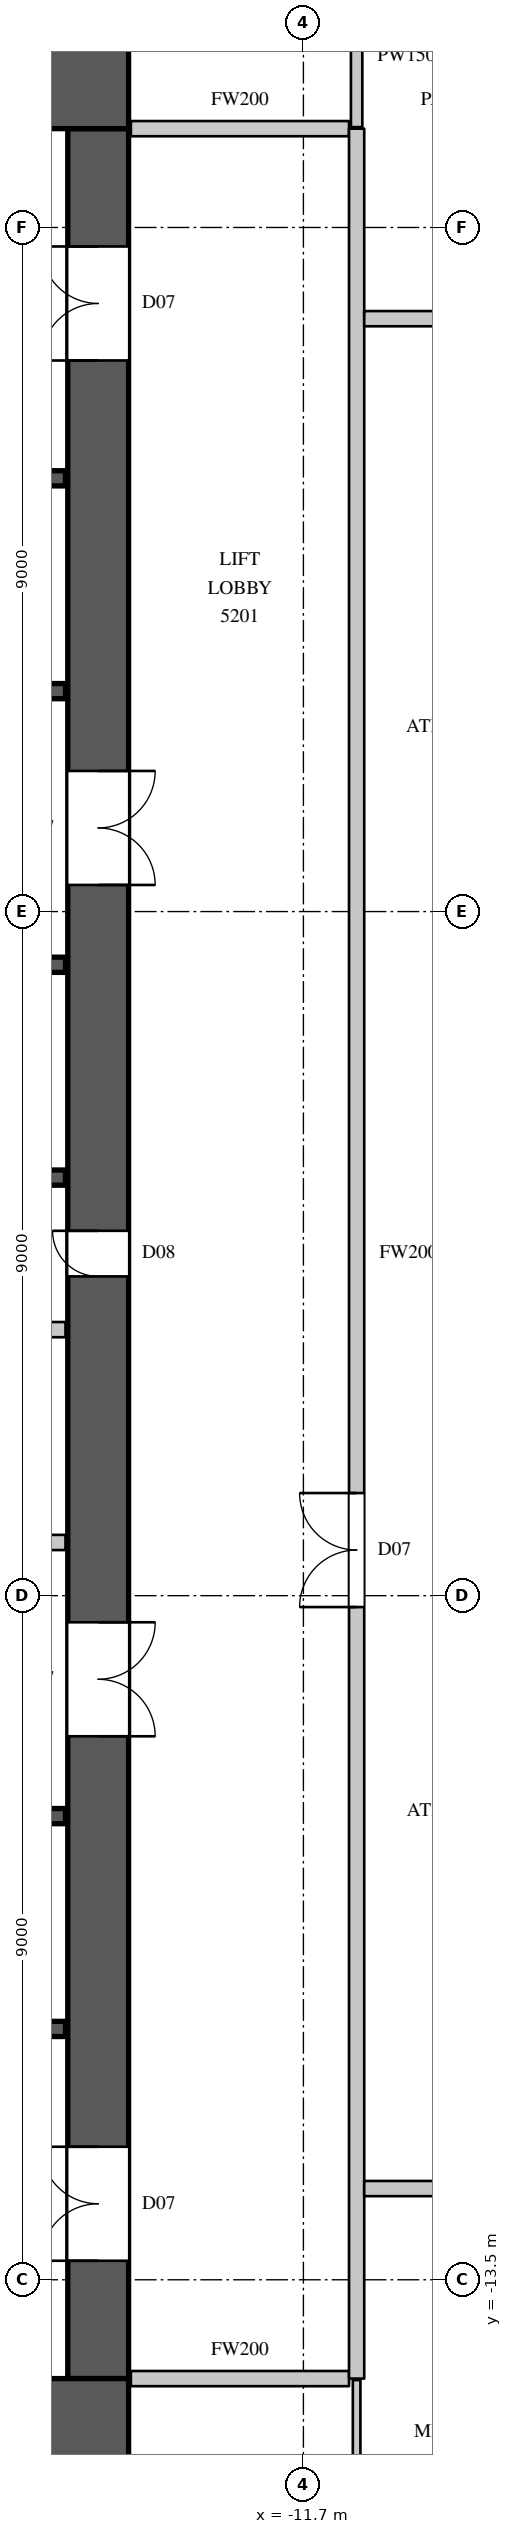
"""IFC4 building model, lengths in metres.
Left out: names, types, materials, properties, quantities, classifications, styles, units other than length and angle.
Written with IfcOpenShell. Run it as: python <this file> out.ifc"""

import sys

from ifc_helpers import new_model, si_unit, direction, frame, frame_2d, origin, place, context, subcontext, project, spatial, rectangle, extrude, element, fill, save


model = new_model("IFC4")
c1 = context("Model", 3, precision=1e-05, world=origin(), true_north=direction((0.0, 1.0)))
c2 = subcontext(c1, "Body", "Model", "MODEL_VIEW")
j1 = project(units=[si_unit("LENGTHUNIT", "METRE"), si_unit("PLANEANGLEUNIT", "RADIAN")], contexts=[c1])
p1 = place(None, origin())
s1 = spatial("IfcSite", under=j1, at=p1, CompositionType="ELEMENT")
p2 = place(p1, origin())
s2 = spatial("IfcBuilding", under=s1, at=p2, CompositionType="ELEMENT")
p3 = place(p2, frame((0.0, 0.0, 234.3)))
s3 = spatial("IfcBuildingStorey", under=s2, at=p3, CompositionType="ELEMENT", Elevation=234.3)
for number, where, z_axis, x_axis in (
    (1, (-30.0, 15.4, 0.0), (0.0, 0.0, 1.0), (1.0, 0.0, 0.0)),
    (2, (-30.0, -15.4, 0.0), (0.0, 0.0, 1.0), (1.0, 0.0, 0.0)),
):
    element("IfcWall", number, at=place(p3, frame(where, z_axis=z_axis, x_axis=x_axis)), inside=s3, PredefinedType="SHEAR", context=c2, shape_type="SweptSolid", body=[
        extrude(rectangle(XDim=16.0, YDim=1.2, at=frame_2d((8.0, 0.0))), origin(), (0.0, 0.0, 1.0), 4.1),
    ])
p4 = place(p3, frame((-14.4, -14.8, 0.0), z_axis=(0.0, 0.0, 1.0), x_axis=(0.0, 1.0, 0.0)))
e3 = element("IfcWall", 3, at=p4, inside=s3, PredefinedType="SHEAR", context=c2, shape_type="SweptSolid", body=[
    extrude(rectangle(XDim=29.6, YDim=0.8, at=frame_2d((14.8, 0.0))), origin(), (0.0, 0.0, 1.0), 4.1),
])
p5 = place(p4, frame((1.55, 0.0, 0.0)))
e4 = element("IfcOpeningElement", 4, at=p5, cuts=e3, PredefinedType="OPENING", context=c2, shape_type="SweptSolid", body=[
    extrude(rectangle(XDim=1.5, YDim=2.4, at=frame_2d((0.75, 1.2))), frame((0.0, 0.41, 0.0), z_axis=(0.0, -1.0, 0.0), x_axis=(1.0, 0.0, 0.0)), (0.0, 0.0, 1.0), 0.82),
])
p6 = place(p4, frame((26.55, 0.0, 0.0)))
e5 = element("IfcOpeningElement", 5, at=p6, cuts=e3, PredefinedType="OPENING", context=c2, shape_type="SweptSolid", body=[
    extrude(rectangle(XDim=1.5, YDim=2.4, at=frame_2d((0.75, 1.2))), frame((0.0, 0.41, 0.0), z_axis=(0.0, -1.0, 0.0), x_axis=(1.0, 0.0, 0.0)), (0.0, 0.0, 1.0), 0.82),
])
p7 = place(p4, frame((8.45, 0.0, 0.0)))
e6 = element("IfcOpeningElement", 6, at=p7, cuts=e3, PredefinedType="OPENING", context=c2, shape_type="SweptSolid", body=[
    extrude(rectangle(XDim=1.5, YDim=2.4, at=frame_2d((0.75, 1.2))), frame((0.0, 0.41, 0.0), z_axis=(0.0, -1.0, 0.0), x_axis=(1.0, 0.0, 0.0)), (0.0, 0.0, 1.0), 0.82),
])
p8 = place(p4, frame((19.65, 0.0, 0.0)))
e7 = element("IfcOpeningElement", 7, at=p8, cuts=e3, PredefinedType="OPENING", context=c2, shape_type="SweptSolid", body=[
    extrude(rectangle(XDim=1.5, YDim=2.4, at=frame_2d((0.75, 1.2))), frame((0.0, 0.41, 0.0), z_axis=(0.0, -1.0, 0.0), x_axis=(1.0, 0.0, 0.0)), (0.0, 0.0, 1.0), 0.82),
])
p9 = place(p4, frame((14.5, 0.0, 0.0)))
e8 = element("IfcOpeningElement", 8, at=p9, cuts=e3, PredefinedType="OPENING", context=c2, shape_type="SweptSolid", body=[
    extrude(rectangle(XDim=0.6, YDim=2.0, at=frame_2d((0.3, 1.0))), frame((0.0, 0.41, 0.0), z_axis=(0.0, -1.0, 0.0), x_axis=(1.0, 0.0, 0.0)), (0.0, 0.0, 1.0), 0.82),
])
p10 = place(p3, frame((-18.18, -3.8, 0.0), z_axis=(0.0, 0.0, 1.0), x_axis=(1.0, 0.0, 0.0)))
e9 = element("IfcWall", 9, at=p10, inside=s3, PredefinedType="PARTITIONING", context=c2, shape_type="SweptSolid", body=[
    extrude(rectangle(XDim=3.35, YDim=0.2, at=frame_2d((1.675, 0.0))), origin(), (0.0, 0.0, 1.0), 3.8),
])
p11 = place(p10, frame((1.2, 0.0, 0.0)))
e10 = element("IfcOpeningElement", 10, at=p11, cuts=e9, PredefinedType="OPENING", context=c2, shape_type="SweptSolid", body=[
    extrude(rectangle(XDim=0.9, YDim=2.2, at=frame_2d((0.45, 1.1))), frame((0.0, 0.11, 0.0), z_axis=(0.0, -1.0, 0.0), x_axis=(1.0, 0.0, 0.0)), (0.0, 0.0, 1.0), 0.22),
])
for number, where, z_axis, x_axis in (
    (11, (-13.97, -14.8, 0.0), (0.0, 0.0, 1.0), (1.0, 0.0, 0.0)),
    (12, (-13.97, 14.8, 0.0), (0.0, 0.0, 1.0), (1.0, 0.0, 0.0)),
):
    element("IfcWall", number, at=place(p3, frame(where, z_axis=z_axis, x_axis=x_axis)), inside=s3, PredefinedType="PARTITIONING", context=c2, shape_type="SweptSolid", body=[
        extrude(rectangle(XDim=2.87, YDim=0.2, at=frame_2d((1.435, 0.0))), origin(), (0.0, 0.0, 1.0), 3.8),
    ])
p12 = place(p3, frame((-11.0, -14.8, 0.0), z_axis=(0.0, 0.0, 1.0), x_axis=(0.0, 1.0, 0.0)))
e13 = element("IfcWall", 13, at=p12, inside=s3, PredefinedType="PARTITIONING", context=c2, shape_type="SweptSolid", body=[
    extrude(rectangle(XDim=29.6, YDim=0.2, at=frame_2d((14.8, 0.0))), origin(), (0.0, 0.0, 1.0), 3.8),
])
p13 = place(p12, frame((10.15, 0.0, 0.0)))
e14 = element("IfcOpeningElement", 14, at=p13, cuts=e13, PredefinedType="OPENING", context=c2, shape_type="SweptSolid", body=[
    extrude(rectangle(XDim=1.5, YDim=2.4, at=frame_2d((0.75, 1.2))), frame((0.0, 0.11, 0.0), z_axis=(0.0, -1.0, 0.0), x_axis=(1.0, 0.0, 0.0)), (0.0, 0.0, 1.0), 0.22),
])
p14 = place(p3, frame((-10.9, -12.3, 0.0), z_axis=(0.0, 0.0, 1.0), x_axis=(1.0, 0.0, 0.0)))
e15 = element("IfcWall", 15, at=p14, inside=s3, PredefinedType="PARTITIONING", context=c2, shape_type="SweptSolid", body=[
    extrude(rectangle(XDim=22.1, YDim=0.2, at=frame_2d((11.05, 0.0))), origin(), (0.0, 0.0, 1.0), 3.8),
])
p15 = place(p14, frame((1.1, 0.0, 0.0)))
e16 = element("IfcOpeningElement", 16, at=p15, cuts=e15, PredefinedType="OPENING", context=c2, shape_type="SweptSolid", body=[
    extrude(rectangle(XDim=0.9, YDim=2.2, at=frame_2d((0.45, 1.1))), frame((0.0, 0.11, 0.0), z_axis=(0.0, -1.0, 0.0), x_axis=(1.0, 0.0, 0.0)), (0.0, 0.0, 1.0), 0.22),
])
p16 = place(p14, frame((4.9, 0.0, 0.0)))
e17 = element("IfcOpeningElement", 17, at=p16, cuts=e15, PredefinedType="OPENING", context=c2, shape_type="SweptSolid", body=[
    extrude(rectangle(XDim=0.9, YDim=2.2, at=frame_2d((0.45, 1.1))), frame((0.0, 0.11, 0.0), z_axis=(0.0, -1.0, 0.0), x_axis=(1.0, 0.0, 0.0)), (0.0, 0.0, 1.0), 0.22),
])
p17 = place(p14, frame((7.55, 0.0, 0.0)))
e18 = element("IfcOpeningElement", 18, at=p17, cuts=e15, PredefinedType="OPENING", context=c2, shape_type="SweptSolid", body=[
    extrude(rectangle(XDim=0.9, YDim=2.2, at=frame_2d((0.45, 1.1))), frame((0.0, 0.11, 0.0), z_axis=(0.0, -1.0, 0.0), x_axis=(1.0, 0.0, 0.0)), (0.0, 0.0, 1.0), 0.22),
])
p18 = place(p14, frame((9.95, 0.0, 0.0)))
e19 = element("IfcOpeningElement", 19, at=p18, cuts=e15, PredefinedType="OPENING", context=c2, shape_type="SweptSolid", body=[
    extrude(rectangle(XDim=1.1, YDim=2.4, at=frame_2d((0.55, 1.2))), frame((0.0, 0.11, 0.0), z_axis=(0.0, -1.0, 0.0), x_axis=(1.0, 0.0, 0.0)), (0.0, 0.0, 1.0), 0.22),
])
p19 = place(p14, frame((14.4, 0.0, 0.0)))
e20 = element("IfcOpeningElement", 20, at=p19, cuts=e15, PredefinedType="OPENING", context=c2, shape_type="SweptSolid", body=[
    extrude(rectangle(XDim=1.1, YDim=2.4, at=frame_2d((0.55, 1.2))), frame((0.0, 0.11, 0.0), z_axis=(0.0, -1.0, 0.0), x_axis=(1.0, 0.0, 0.0)), (0.0, 0.0, 1.0), 0.22),
])
p20 = place(p14, frame((17.95, 0.0, 0.0)))
e21 = element("IfcOpeningElement", 21, at=p20, cuts=e15, PredefinedType="OPENING", context=c2, shape_type="SweptSolid", body=[
    extrude(rectangle(XDim=1.1, YDim=2.4, at=frame_2d((0.55, 1.2))), frame((0.0, 0.11, 0.0), z_axis=(0.0, -1.0, 0.0), x_axis=(1.0, 0.0, 0.0)), (0.0, 0.0, 1.0), 0.22),
])
p21 = place(p3, frame((-10.9, 12.3, 0.0), z_axis=(0.0, 0.0, 1.0), x_axis=(1.0, 0.0, 0.0)))
e22 = element("IfcWall", 22, at=p21, inside=s3, PredefinedType="PARTITIONING", context=c2, shape_type="SweptSolid", body=[
    extrude(rectangle(XDim=3.735, YDim=0.2, at=frame_2d((1.867, 0.0))), origin(), (0.0, 0.0, 1.0), 3.8),
])
p22 = place(p21, frame((1.7, 0.0, 0.0)))
e23 = element("IfcOpeningElement", 23, at=p22, cuts=e22, PredefinedType="OPENING", context=c2, shape_type="SweptSolid", body=[
    extrude(rectangle(XDim=1.1, YDim=2.4, at=frame_2d((0.55, 1.2))), frame((0.0, 0.11, 0.0), z_axis=(0.0, -1.0, 0.0), x_axis=(1.0, 0.0, 0.0)), (0.0, 0.0, 1.0), 0.22),
])
p23 = place(p3, frame((-11.0, 14.82, 0.0), z_axis=(0.0, 0.0, 1.0), x_axis=(0.0, 1.0, 0.0)))
e24 = element("IfcWall", 24, at=p23, inside=s3, PredefinedType="PARTITIONING", context=c2, shape_type="SweptSolid", body=[
    extrude(rectangle(XDim=1.88, YDim=0.15, at=frame_2d((0.94, 0.0))), origin(), (0.0, 0.0, 1.0), 3.8),
])
p24 = place(p3, frame((-29.17, -1.0, 0.0), z_axis=(0.0, 0.0, 1.0), x_axis=(1.0, 0.0, 0.0)))
e25 = element("IfcWall", 25, at=p24, inside=s3, PredefinedType="PARTITIONING", context=c2, shape_type="SweptSolid", body=[
    extrude(rectangle(XDim=14.34, YDim=0.2, at=frame_2d((7.17, 0.0))), origin(), (0.0, 0.0, 1.0), 3.8),
])
p25 = place(p3, frame((-26.08, 1.0, 0.0), z_axis=(0.0, 0.0, 1.0), x_axis=(1.0, 0.0, 0.0)))
e26 = element("IfcWall", 26, at=p25, inside=s3, PredefinedType="SHEAR", context=c2, shape_type="SweptSolid", body=[
    extrude(rectangle(XDim=11.25, YDim=0.2, at=frame_2d((5.625, 0.0))), origin(), (0.0, 0.0, 1.0), 3.8),
])
p26 = place(p3, frame((-26.08, 3.8, 0.0), z_axis=(0.0, 0.0, 1.0), x_axis=(1.0, 0.0, 0.0)))
e27 = element("IfcWall", 27, at=p26, inside=s3, PredefinedType="SHEAR", context=c2, shape_type="SweptSolid", body=[
    extrude(rectangle(XDim=11.25, YDim=0.2, at=frame_2d((5.625, 0.0))), origin(), (0.0, 0.0, 1.0), 3.8),
])
p27 = place(p26, frame((0.8, 0.0, 0.0)))
e28 = element("IfcOpeningElement", 28, at=p27, cuts=e27, PredefinedType="OPENING", context=c2, shape_type="SweptSolid", body=[
    extrude(rectangle(XDim=1.1, YDim=2.2, at=frame_2d((0.55, 1.1))), frame((0.0, 0.11, 0.0), z_axis=(0.0, -1.0, 0.0), x_axis=(1.0, 0.0, 0.0)), (0.0, 0.0, 1.0), 0.22),
])
p28 = place(p26, frame((3.55, 0.0, 0.0)))
e29 = element("IfcOpeningElement", 29, at=p28, cuts=e27, PredefinedType="OPENING", context=c2, shape_type="SweptSolid", body=[
    extrude(rectangle(XDim=1.1, YDim=2.2, at=frame_2d((0.55, 1.1))), frame((0.0, 0.11, 0.0), z_axis=(0.0, -1.0, 0.0), x_axis=(1.0, 0.0, 0.0)), (0.0, 0.0, 1.0), 0.22),
])
p29 = place(p26, frame((6.25, 0.0, 0.0)))
e30 = element("IfcOpeningElement", 30, at=p29, cuts=e27, PredefinedType="OPENING", context=c2, shape_type="SweptSolid", body=[
    extrude(rectangle(XDim=1.1, YDim=2.2, at=frame_2d((0.55, 1.1))), frame((0.0, 0.11, 0.0), z_axis=(0.0, -1.0, 0.0), x_axis=(1.0, 0.0, 0.0)), (0.0, 0.0, 1.0), 0.22),
])
p30 = place(p26, frame((9.15, 0.0, 0.0)))
e31 = element("IfcOpeningElement", 31, at=p30, cuts=e27, PredefinedType="OPENING", context=c2, shape_type="SweptSolid", body=[
    extrude(rectangle(XDim=1.1, YDim=2.2, at=frame_2d((0.55, 1.1))), frame((0.0, 0.11, 0.0), z_axis=(0.0, -1.0, 0.0), x_axis=(1.0, 0.0, 0.0)), (0.0, 0.0, 1.0), 0.22),
])
p31 = place(p3, frame((-17.92, -10.2, 0.0), z_axis=(0.0, 0.0, 1.0), x_axis=(1.0, 0.0, 0.0)))
e32 = element("IfcWall", 32, at=p31, inside=s3, PredefinedType="SHEAR", context=c2, shape_type="SweptSolid", body=[
    extrude(rectangle(XDim=3.09, YDim=0.2, at=frame_2d((1.545, 0.0))), origin(), (0.0, 0.0, 1.0), 3.8),
])
p32 = place(p31, frame((1.0, 0.0, 0.0)))
e33 = element("IfcOpeningElement", 33, at=p32, cuts=e32, PredefinedType="OPENING", context=c2, shape_type="SweptSolid", body=[
    extrude(rectangle(XDim=1.1, YDim=2.2, at=frame_2d((0.55, 1.1))), frame((0.0, 0.11, 0.0), z_axis=(0.0, -1.0, 0.0), x_axis=(1.0, 0.0, 0.0)), (0.0, 0.0, 1.0), 0.22),
])
p33 = place(p3, frame((-17.9, -7.4, 0.0), z_axis=(0.0, 0.0, 1.0), x_axis=(1.0, 0.0, 0.0)))
e34 = element("IfcWall", 34, at=p33, inside=s3, PredefinedType="SHEAR", context=c2, shape_type="SweptSolid", body=[
    extrude(rectangle(XDim=3.07, YDim=0.2, at=frame_2d((1.535, 0.0))), origin(), (0.0, 0.0, 1.0), 3.8),
])
p34 = place(p3, frame((-17.92, 7.4, 0.0), z_axis=(0.0, 0.0, 1.0), x_axis=(1.0, 0.0, 0.0)))
e35 = element("IfcWall", 35, at=p34, inside=s3, PredefinedType="SHEAR", context=c2, shape_type="SweptSolid", body=[
    extrude(rectangle(XDim=3.09, YDim=0.2, at=frame_2d((1.545, 0.0))), origin(), (0.0, 0.0, 1.0), 3.8),
])
p35 = place(p3, frame((-17.92, 10.2, 0.0), z_axis=(0.0, 0.0, 1.0), x_axis=(1.0, 0.0, 0.0)))
e36 = element("IfcWall", 36, at=p35, inside=s3, PredefinedType="SHEAR", context=c2, shape_type="SweptSolid", body=[
    extrude(rectangle(XDim=3.09, YDim=0.2, at=frame_2d((1.545, 0.0))), origin(), (0.0, 0.0, 1.0), 3.8),
])
p36 = place(p35, frame((1.0, 0.0, 0.0)))
e37 = element("IfcOpeningElement", 37, at=p36, cuts=e36, PredefinedType="OPENING", context=c2, shape_type="SweptSolid", body=[
    extrude(rectangle(XDim=1.1, YDim=2.2, at=frame_2d((0.55, 1.1))), frame((0.0, 0.11, 0.0), z_axis=(0.0, -1.0, 0.0), x_axis=(1.0, 0.0, 0.0)), (0.0, 0.0, 1.0), 0.22),
])
p37 = place(p3, frame((-11.0, -16.7, 0.0), z_axis=(0.0, 0.0, 1.0), x_axis=(0.0, 1.0, 0.0)))
e38 = element("IfcWall", 38, at=p37, inside=s3, PredefinedType="PARTITIONING", context=c2, shape_type="SweptSolid", body=[
    extrude(rectangle(XDim=1.88, YDim=0.1, at=frame_2d((0.94, 0.0))), origin(), (0.0, 0.0, 1.0), 3.8),
])
p38 = place(p13, origin())
e39 = element("IfcDoor", 39, at=p38, inside=s3, OperationType="DOUBLE_DOOR_SINGLE_SWING", PredefinedType="DOOR", context=c2, shape_type="SweptSolid", body=[
    extrude(rectangle(XDim=1.5, YDim=2.4, at=frame_2d((0.75, 1.2))), frame((0.0, 0.025, 0.0), z_axis=(0.0, -1.0, 0.0), x_axis=(1.0, 0.0, 0.0)), (0.0, 0.0, 1.0), 0.05),
])
fill(e14, e39)
p39 = place(p5, origin())
e40 = element("IfcDoor", 40, at=p39, inside=s3, OperationType="DOUBLE_DOOR_SINGLE_SWING", PredefinedType="DOOR", context=c2, shape_type="SweptSolid", body=[
    extrude(rectangle(XDim=1.5, YDim=2.4, at=frame_2d((0.75, 1.2))), frame((0.0, 0.395, 0.0), z_axis=(0.0, -1.0, 0.0), x_axis=(1.0, 0.0, 0.0)), (0.0, 0.0, 1.0), 0.05),
])
fill(e4, e40)
p40 = place(p6, origin())
e41 = element("IfcDoor", 41, at=p40, inside=s3, OperationType="DOUBLE_DOOR_SINGLE_SWING", PredefinedType="DOOR", context=c2, shape_type="SweptSolid", body=[
    extrude(rectangle(XDim=1.5, YDim=2.4, at=frame_2d((0.75, 1.2))), frame((0.0, 0.395, 0.0), z_axis=(0.0, -1.0, 0.0), x_axis=(1.0, 0.0, 0.0)), (0.0, 0.0, 1.0), 0.05),
])
fill(e5, e41)
p41 = place(p7, origin())
e42 = element("IfcDoor", 42, at=p41, inside=s3, OperationType="DOUBLE_DOOR_SINGLE_SWING", PredefinedType="DOOR", context=c2, shape_type="SweptSolid", body=[
    extrude(rectangle(XDim=1.5, YDim=2.4, at=frame_2d((0.75, 1.2))), frame((0.0, -0.345, 0.0), z_axis=(0.0, -1.0, 0.0), x_axis=(1.0, 0.0, 0.0)), (0.0, 0.0, 1.0), 0.05),
])
fill(e6, e42)
p42 = place(p8, origin())
e43 = element("IfcDoor", 43, at=p42, inside=s3, OperationType="DOUBLE_DOOR_SINGLE_SWING", PredefinedType="DOOR", context=c2, shape_type="SweptSolid", body=[
    extrude(rectangle(XDim=1.5, YDim=2.4, at=frame_2d((0.75, 1.2))), frame((0.0, -0.345, 0.0), z_axis=(0.0, -1.0, 0.0), x_axis=(1.0, 0.0, 0.0)), (0.0, 0.0, 1.0), 0.05),
])
fill(e7, e43)
p43 = place(p9, origin())
e44 = element("IfcDoor", 44, at=p43, inside=s3, OperationType="SINGLE_SWING_RIGHT", PredefinedType="DOOR", context=c2, shape_type="SweptSolid", body=[
    extrude(rectangle(XDim=0.6, YDim=2.0, at=frame_2d((0.3, 1.0))), frame((0.0, 0.395, 0.0), z_axis=(0.0, -1.0, 0.0), x_axis=(1.0, 0.0, 0.0)), (0.0, 0.0, 1.0), 0.05),
])
fill(e8, e44)
save(model, sys.argv[1])
